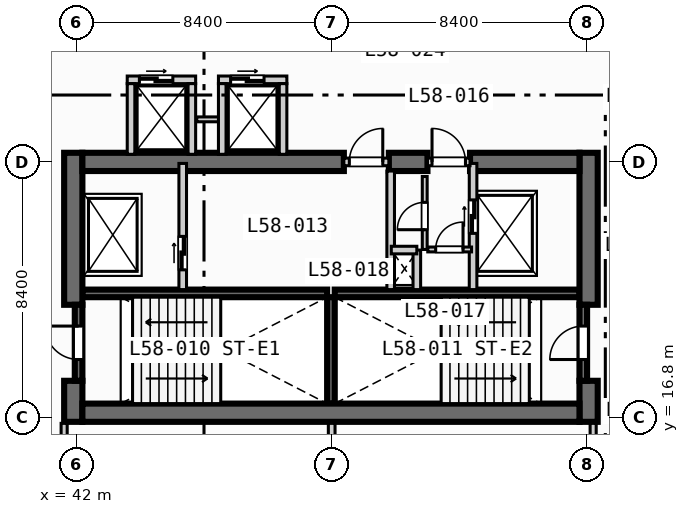
"""IFC4 building model, lengths in metres.
Left out: names, types, materials, properties, quantities, classifications, styles, units other than length and angle.
Written with IfcOpenShell. Run it as: python <this file> out.ifc"""

import sys

from ifc_helpers import new_model, si_unit, direction, frame, frame_2d, origin, place, context, subcontext, project, spatial, rectangle, extrude, element, fill, save


model = new_model("IFC4")
c1 = context("Model", 3, precision=1e-05, world=origin(), true_north=direction((0.0, 1.0)))
c2 = subcontext(c1, "Body", "Model", "MODEL_VIEW")
j1 = project(units=[si_unit("LENGTHUNIT", "METRE"), si_unit("PLANEANGLEUNIT", "RADIAN")], contexts=[c1])
p1 = place(None, origin())
s1 = spatial("IfcSite", under=j1, at=p1, CompositionType="ELEMENT")
p2 = place(p1, origin())
s2 = spatial("IfcBuilding", under=s1, at=p2, CompositionType="ELEMENT")
p3 = place(p2, frame((0.0, 0.0, 237.9)))
s3 = spatial("IfcBuildingStorey", under=s2, at=p3, CompositionType="ELEMENT", Elevation=237.9)
for number, where, z_axis, x_axis in (
    (1, (42.2, 20.875, 0.0), (0.0, 0.0, 1.0), (1.0, 0.0, 0.0)),
    (2, (50.5, 20.875, 0.0), (0.0, 0.0, 1.0), (1.0, 0.0, 0.0)),
):
    element("IfcWall", number, at=place(p3, frame(where, z_axis=z_axis, x_axis=x_axis)), inside=s3, PredefinedType="SOLIDWALL", context=c2, shape_type="SweptSolid", body=[
        extrude(rectangle(XDim=8.05, YDim=0.25, at=frame_2d((4.025, 0.0))), origin(), (0.0, 0.0, 1.0), 3.47),
    ])
p4 = place(p3, frame((50.375, 17.25, 0.0), z_axis=(0.0, 0.0, 1.0), x_axis=(0.0, 1.0, 0.0)))
e3 = element("IfcWall", 3, at=p4, inside=s3, PredefinedType="SOLIDWALL", context=c2, shape_type="SweptSolid", body=[
    extrude(rectangle(XDim=3.5, YDim=0.25, at=frame_2d((1.75, 0.0))), origin(), (0.0, 0.0, 1.0), 3.47),
])
p5 = place(p3, frame((41.9, 16.65, 0.0), z_axis=(0.0, 0.0, 1.0), x_axis=(0.0, 1.0, 0.0)))
e4 = element("IfcWall", 4, at=p5, inside=s3, PredefinedType="SHEAR", context=c2, shape_type="SweptSolid", body=[
    extrude(rectangle(XDim=1.35, YDim=0.6, at=frame_2d((0.675, 0.0))), origin(), (0.0, 0.0, 1.0), 3.47),
])
p6 = place(p3, frame((41.9, 20.5, 0.0), z_axis=(0.0, 0.0, 1.0), x_axis=(0.0, 1.0, 0.0)))
e5 = element("IfcWall", 5, at=p6, inside=s3, PredefinedType="SHEAR", context=c2, shape_type="SweptSolid", body=[
    extrude(rectangle(XDim=5.0, YDim=0.6, at=frame_2d((2.5, 0.0))), origin(), (0.0, 0.0, 1.0), 3.47),
])
p7 = place(p3, frame((58.85, 16.65, 0.0), z_axis=(0.0, 0.0, 1.0), x_axis=(0.0, 1.0, 0.0)))
e6 = element("IfcWall", 6, at=p7, inside=s3, PredefinedType="SHEAR", context=c2, shape_type="SweptSolid", body=[
    extrude(rectangle(XDim=1.35, YDim=0.6, at=frame_2d((0.675, 0.0))), origin(), (0.0, 0.0, 1.0), 3.47),
])
p8 = place(p3, frame((58.85, 20.5, 0.0), z_axis=(0.0, 0.0, 1.0), x_axis=(0.0, 1.0, 0.0)))
e7 = element("IfcWall", 7, at=p8, inside=s3, PredefinedType="SHEAR", context=c2, shape_type="SweptSolid", body=[
    extrude(rectangle(XDim=5.0, YDim=0.6, at=frame_2d((2.5, 0.0))), origin(), (0.0, 0.0, 1.0), 3.47),
])
p9 = place(p3, frame((42.2, 16.95, 0.0), z_axis=(0.0, 0.0, 1.0), x_axis=(1.0, 0.0, 0.0)))
e8 = element("IfcWall", 8, at=p9, inside=s3, PredefinedType="SHEAR", context=c2, shape_type="SweptSolid", body=[
    extrude(rectangle(XDim=16.35, YDim=0.6, at=frame_2d((8.175, 0.0))), origin(), (0.0, 0.0, 1.0), 3.47),
])
p10 = place(p3, frame((42.2, 25.2, 0.0), z_axis=(0.0, 0.0, 1.0), x_axis=(1.0, 0.0, 0.0)))
e9 = element("IfcWall", 9, at=p10, inside=s3, PredefinedType="SHEAR", context=c2, shape_type="SweptSolid", body=[
    extrude(rectangle(XDim=8.6, YDim=0.6, at=frame_2d((4.3, 0.0))), origin(), (0.0, 0.0, 1.0), 3.47),
])
p11 = place(p3, frame((52.28, 25.2, 0.0), z_axis=(0.0, 0.0, 1.0), x_axis=(1.0, 0.0, 0.0)))
e10 = element("IfcWall", 10, at=p11, inside=s3, PredefinedType="SHEAR", context=c2, shape_type="SweptSolid", body=[
    extrude(rectangle(XDim=1.27, YDim=0.6, at=frame_2d((0.635, 0.0))), origin(), (0.0, 0.0, 1.0), 3.47),
])
p12 = place(p3, frame((54.95, 25.2, 0.0), z_axis=(0.0, 0.0, 1.0), x_axis=(1.0, 0.0, 0.0)))
e11 = element("IfcWall", 11, at=p12, inside=s3, PredefinedType="SHEAR", context=c2, shape_type="SweptSolid", body=[
    extrude(rectangle(XDim=3.6, YDim=0.6, at=frame_2d((1.8, 0.0))), origin(), (0.0, 0.0, 1.0), 3.47),
])
p13 = place(p3, frame((42.075, 18.0, 0.0), z_axis=(0.0, 0.0, 1.0), x_axis=(0.0, 1.0, 0.0)))
e12 = element("IfcWall", 12, at=p13, inside=s3, PredefinedType="SOLIDWALL", context=c2, shape_type="SweptSolid", body=[
    extrude(rectangle(XDim=2.5, YDim=0.25, at=frame_2d((1.25, 0.0))), origin(), (0.0, 0.0, 1.0), 3.47),
])
p14 = place(p13, frame((0.7, 0.0, 0.0)))
e13 = element("IfcOpeningElement", 13, at=p14, cuts=e12, PredefinedType="OPENING", context=c2, shape_type="SweptSolid", body=[
    extrude(rectangle(XDim=1.1, YDim=2.15, at=frame_2d((0.55, 1.075))), frame((0.0, 0.135, 0.0), z_axis=(0.0, -1.0, 0.0), x_axis=(1.0, 0.0, 0.0)), (0.0, 0.0, 1.0), 0.27),
])
p15 = place(p3, frame((58.675, 18.0, 0.0), z_axis=(0.0, 0.0, 1.0), x_axis=(0.0, 1.0, 0.0)))
e14 = element("IfcWall", 14, at=p15, inside=s3, PredefinedType="SOLIDWALL", context=c2, shape_type="SweptSolid", body=[
    extrude(rectangle(XDim=2.5, YDim=0.25, at=frame_2d((1.25, 0.0))), origin(), (0.0, 0.0, 1.0), 3.47),
])
p16 = place(p15, frame((0.7, 0.0, 0.0)))
e15 = element("IfcOpeningElement", 15, at=p16, cuts=e14, PredefinedType="OPENING", context=c2, shape_type="SweptSolid", body=[
    extrude(rectangle(XDim=1.1, YDim=2.15, at=frame_2d((0.55, 1.075))), frame((0.0, 0.135, 0.0), z_axis=(0.0, -1.0, 0.0), x_axis=(1.0, 0.0, 0.0)), (0.0, 0.0, 1.0), 0.27),
])
p17 = place(p3, frame((45.5, 21.0, 0.0), z_axis=(0.0, 0.0, 1.0), x_axis=(0.0, 1.0, 0.0)))
e16 = element("IfcWall", 16, at=p17, inside=s3, PredefinedType="SOLIDWALL", context=c2, shape_type="SweptSolid", body=[
    extrude(rectangle(XDim=4.15, YDim=0.25, at=frame_2d((2.075, 0.0))), origin(), (0.0, 0.0, 1.0), 3.47),
])
p18 = place(p17, frame((0.65, 0.0, 0.0)))
e17 = element("IfcOpeningElement", 17, at=p18, cuts=e16, PredefinedType="OPENING", context=c2, shape_type="SweptSolid", body=[
    extrude(rectangle(XDim=1.1, YDim=2.15, at=frame_2d((0.55, 1.075))), frame((0.0, 0.135, 0.0), z_axis=(0.0, -1.0, 0.0), x_axis=(1.0, 0.0, 0.0)), (0.0, 0.0, 1.0), 0.27),
])
p19 = place(p3, frame((50.8, 25.2, 0.0), z_axis=(0.0, 0.0, 1.0), x_axis=(1.0, 0.0, 0.0)))
e18 = element("IfcWall", 18, at=p19, inside=s3, PredefinedType="SOLIDWALL", context=c2, shape_type="SweptSolid", body=[
    extrude(rectangle(XDim=1.48, YDim=0.25, at=frame_2d((0.74, 0.0))), origin(), (0.0, 0.0, 1.0), 3.47),
])
p20 = place(p19, frame((0.18, 0.0, 0.0)))
e19 = element("IfcOpeningElement", 19, at=p20, cuts=e18, PredefinedType="OPENING", context=c2, shape_type="SweptSolid", body=[
    extrude(rectangle(XDim=1.1, YDim=2.15, at=frame_2d((0.55, 1.075))), frame((0.0, 0.135, 0.0), z_axis=(0.0, -1.0, 0.0), x_axis=(1.0, 0.0, 0.0)), (0.0, 0.0, 1.0), 0.27),
])
p21 = place(p3, frame((52.34, 21.0, 0.0), z_axis=(0.0, 0.0, 1.0), x_axis=(0.0, 1.0, 0.0)))
e20 = element("IfcWall", 20, at=p21, inside=s3, PredefinedType="SOLIDWALL", context=c2, shape_type="SweptSolid", body=[
    extrude(rectangle(XDim=3.9, YDim=0.25, at=frame_2d((1.95, 0.0))), origin(), (0.0, 0.0, 1.0), 3.47),
])
p22 = place(p3, frame((55.05, 21.0, 0.0), z_axis=(0.0, 0.0, 1.0), x_axis=(0.0, 1.0, 0.0)))
e21 = element("IfcWall", 21, at=p22, inside=s3, PredefinedType="SOLIDWALL", context=c2, shape_type="SweptSolid", body=[
    extrude(rectangle(XDim=4.15, YDim=0.25, at=frame_2d((2.075, 0.0))), origin(), (0.0, 0.0, 1.0), 3.47),
])
p23 = place(p22, frame((1.85, 0.0, 0.0)))
e22 = element("IfcOpeningElement", 22, at=p23, cuts=e21, PredefinedType="OPENING", context=c2, shape_type="SweptSolid", body=[
    extrude(rectangle(XDim=1.1, YDim=2.15, at=frame_2d((0.55, 1.075))), frame((0.0, 0.135, 0.0), z_axis=(0.0, -1.0, 0.0), x_axis=(1.0, 0.0, 0.0)), (0.0, 0.0, 1.0), 0.27),
])
p24 = place(p3, frame((53.55, 25.2, 0.0), z_axis=(0.0, 0.0, 1.0), x_axis=(1.0, 0.0, 0.0)))
e23 = element("IfcWall", 23, at=p24, inside=s3, PredefinedType="SOLIDWALL", context=c2, shape_type="SweptSolid", body=[
    extrude(rectangle(XDim=1.4, YDim=0.25, at=frame_2d((0.7, 0.0))), origin(), (0.0, 0.0, 1.0), 3.47),
])
p25 = place(p24, frame((0.15, 0.0, 0.0)))
e24 = element("IfcOpeningElement", 24, at=p25, cuts=e23, PredefinedType="OPENING", context=c2, shape_type="SweptSolid", body=[
    extrude(rectangle(XDim=1.1, YDim=2.15, at=frame_2d((0.55, 1.075))), frame((0.0, 0.135, 0.0), z_axis=(0.0, -1.0, 0.0), x_axis=(1.0, 0.0, 0.0)), (0.0, 0.0, 1.0), 0.27),
])
p26 = place(p3, frame((53.2, 21.0, 0.0), z_axis=(0.0, 0.0, 1.0), x_axis=(0.0, 1.0, 0.0)))
e25 = element("IfcWall", 25, at=p26, inside=s3, PredefinedType="SOLIDWALL", context=c2, shape_type="SweptSolid", body=[
    extrude(rectangle(XDim=1.3, YDim=0.25, at=frame_2d((0.65, 0.0))), origin(), (0.0, 0.0, 1.0), 3.47),
])
p27 = place(p3, frame((52.36, 22.3, 0.0), z_axis=(0.0, 0.0, 1.0), x_axis=(1.0, 0.0, 0.0)))
e26 = element("IfcWall", 26, at=p27, inside=s3, PredefinedType="SOLIDWALL", context=c2, shape_type="SweptSolid", body=[
    extrude(rectangle(XDim=0.84, YDim=0.25, at=frame_2d((0.42, 0.0))), origin(), (0.0, 0.0, 1.0), 3.47),
])
p28 = place(p3, frame((53.56, 22.32, 0.0), z_axis=(0.0, 0.0, 1.0), x_axis=(1.0, 0.0, 0.0)))
e27 = element("IfcWall", 27, at=p28, inside=s3, PredefinedType="PARTITIONING", context=c2, shape_type="SweptSolid", body=[
    extrude(rectangle(XDim=1.44, YDim=0.16, at=frame_2d((0.72, 0.0))), origin(), (0.0, 0.0, 1.0), 3.47),
])
p29 = place(p28, frame((0.26, 0.0, 0.0)))
e28 = element("IfcOpeningElement", 28, at=p29, cuts=e27, PredefinedType="OPENING", context=c2, shape_type="SweptSolid", body=[
    extrude(rectangle(XDim=0.9, YDim=2.1, at=frame_2d((0.45, 1.05))), frame((0.0, 0.09, 0.0), z_axis=(0.0, -1.0, 0.0), x_axis=(1.0, 0.0, 0.0)), (0.0, 0.0, 1.0), 0.18),
])
p30 = place(p3, frame((53.46, 22.32, 0.0), z_axis=(0.0, 0.0, 1.0), x_axis=(0.0, 1.0, 0.0)))
e29 = element("IfcWall", 29, at=p30, inside=s3, PredefinedType="PARTITIONING", context=c2, shape_type="SweptSolid", body=[
    extrude(rectangle(XDim=2.4, YDim=0.16, at=frame_2d((1.2, 0.0))), origin(), (0.0, 0.0, 1.0), 3.47),
])
p31 = place(p30, frame((0.65, 0.0, 0.0)))
e30 = element("IfcOpeningElement", 30, at=p31, cuts=e29, PredefinedType="OPENING", context=c2, shape_type="SweptSolid", body=[
    extrude(rectangle(XDim=0.9, YDim=2.1, at=frame_2d((0.45, 1.05))), frame((0.0, 0.09, 0.0), z_axis=(0.0, -1.0, 0.0), x_axis=(1.0, 0.0, 0.0)), (0.0, 0.0, 1.0), 0.18),
])
p32 = place(p3, frame((43.675, 27.9, 0.0), z_axis=(0.0, 0.0, 1.0), x_axis=(1.0, 0.0, 0.0)))
e31 = element("IfcWall", 31, at=p32, inside=s3, PredefinedType="SOLIDWALL", context=c2, shape_type="SweptSolid", body=[
    extrude(rectangle(XDim=2.25, YDim=0.25, at=frame_2d((1.125, 0.0))), origin(), (0.0, 0.0, 1.0), 3.47),
])
p33 = place(p32, frame((0.4, 0.0, 0.0)))
e32 = element("IfcOpeningElement", 32, at=p33, cuts=e31, PredefinedType="OPENING", context=c2, shape_type="SweptSolid", body=[
    extrude(rectangle(XDim=1.1, YDim=2.15, at=frame_2d((0.55, 1.075))), frame((0.0, 0.135, 0.0), z_axis=(0.0, -1.0, 0.0), x_axis=(1.0, 0.0, 0.0)), (0.0, 0.0, 1.0), 0.27),
])
for number, where, z_axis, x_axis in (
    (33, (43.8, 25.45, 0.0), (0.0, 0.0, 1.0), (0.0, 1.0, 0.0)),
    (34, (45.8, 25.45, 0.0), (0.0, 0.0, 1.0), (0.0, 1.0, 0.0)),
):
    element("IfcWall", number, at=place(p3, frame(where, z_axis=z_axis, x_axis=x_axis)), inside=s3, PredefinedType="SOLIDWALL", context=c2, shape_type="SweptSolid", body=[
        extrude(rectangle(XDim=2.325, YDim=0.25, at=frame_2d((1.163, 0.0))), origin(), (0.0, 0.0, 1.0), 3.47),
    ])
p34 = place(p3, frame((45.96, 26.6, 0.0), z_axis=(0.0, 0.0, 1.0), x_axis=(1.0, 0.0, 0.0)))
e35 = element("IfcWall", 35, at=p34, inside=s3, PredefinedType="PARTITIONING", context=c2, shape_type="SweptSolid", body=[
    extrude(rectangle(XDim=0.88, YDim=0.16, at=frame_2d((0.44, 0.0))), origin(), (0.0, 0.0, 1.0), 3.47),
])
p35 = place(p3, frame((46.675, 27.9, 0.0), z_axis=(0.0, 0.0, 1.0), x_axis=(1.0, 0.0, 0.0)))
e36 = element("IfcWall", 36, at=p35, inside=s3, PredefinedType="SOLIDWALL", context=c2, shape_type="SweptSolid", body=[
    extrude(rectangle(XDim=2.25, YDim=0.25, at=frame_2d((1.125, 0.0))), origin(), (0.0, 0.0, 1.0), 3.47),
])
p36 = place(p35, frame((0.4, 0.0, 0.0)))
e37 = element("IfcOpeningElement", 37, at=p36, cuts=e36, PredefinedType="OPENING", context=c2, shape_type="SweptSolid", body=[
    extrude(rectangle(XDim=1.1, YDim=2.15, at=frame_2d((0.55, 1.075))), frame((0.0, 0.135, 0.0), z_axis=(0.0, -1.0, 0.0), x_axis=(1.0, 0.0, 0.0)), (0.0, 0.0, 1.0), 0.27),
])
for number, where, z_axis, x_axis in (
    (38, (46.8, 25.45, 0.0), (0.0, 0.0, 1.0), (0.0, 1.0, 0.0)),
    (39, (48.8, 25.45, 0.0), (0.0, 0.0, 1.0), (0.0, 1.0, 0.0)),
):
    element("IfcWall", number, at=place(p3, frame(where, z_axis=z_axis, x_axis=x_axis)), inside=s3, PredefinedType="SOLIDWALL", context=c2, shape_type="SweptSolid", body=[
        extrude(rectangle(XDim=2.325, YDim=0.25, at=frame_2d((1.163, 0.0))), origin(), (0.0, 0.0, 1.0), 3.47),
    ])
p37 = place(p3, frame((41.6, 8.65, 0.0), z_axis=(0.0, 0.0, 1.0), x_axis=(0.0, 1.0, 0.0)))
e40 = element("IfcWall", 40, at=p37, inside=s3, PredefinedType="PARTITIONING", context=c2, shape_type="SweptSolid", body=[
    extrude(rectangle(XDim=7.95, YDim=0.2, at=frame_2d((3.975, 0.0))), origin(), (0.0, 0.0, 1.0), 3.47),
])
p38 = place(p37, frame((2.2, 0.0, 0.0)))
e41 = element("IfcOpeningElement", 41, at=p38, cuts=e40, PredefinedType="OPENING", context=c2, shape_type="SweptSolid", body=[
    extrude(rectangle(XDim=0.92, YDim=2.1, at=frame_2d((0.46, 1.05))), frame((0.0, 0.11, 0.0), z_axis=(0.0, -1.0, 0.0), x_axis=(1.0, 0.0, 0.0)), (0.0, 0.0, 1.0), 0.22),
])
p39 = place(p3, frame((59.0, 8.65, 0.0), z_axis=(0.0, 0.0, 1.0), x_axis=(0.0, 1.0, 0.0)))
e42 = element("IfcWall", 42, at=p39, inside=s3, PredefinedType="PARTITIONING", context=c2, shape_type="SweptSolid", body=[
    extrude(rectangle(XDim=7.95, YDim=0.2, at=frame_2d((3.975, 0.0))), origin(), (0.0, 0.0, 1.0), 3.16),
])
p40 = place(p39, frame((2.2, 0.0, 0.0)))
e43 = element("IfcOpeningElement", 43, at=p40, cuts=e42, PredefinedType="OPENING", context=c2, shape_type="SweptSolid", body=[
    extrude(rectangle(XDim=0.92, YDim=2.1, at=frame_2d((0.46, 1.05))), frame((0.0, 0.11, 0.0), z_axis=(0.0, -1.0, 0.0), x_axis=(1.0, 0.0, 0.0)), (0.0, 0.0, 1.0), 0.22),
])
p41 = place(p3, frame((50.4, 8.65, 0.0), z_axis=(0.0, 0.0, 1.0), x_axis=(0.0, 1.0, 0.0)))
e44 = element("IfcWall", 44, at=p41, inside=s3, PredefinedType="PARTITIONING", context=c2, shape_type="SweptSolid", body=[
    extrude(rectangle(XDim=7.95, YDim=0.22, at=frame_2d((3.975, 0.0))), origin(), (0.0, 0.0, 1.0), 2.82),
])
p42 = place(p14, origin())
e45 = element("IfcDoor", 45, at=p42, inside=s3, OperationType="SINGLE_SWING_RIGHT", PredefinedType="DOOR", context=c2, shape_type="SweptSolid", body=[
    extrude(rectangle(XDim=1.1, YDim=2.15, at=frame_2d((0.55, 1.075))), frame((0.0, 0.025, 0.0), z_axis=(0.0, -1.0, 0.0), x_axis=(1.0, 0.0, 0.0)), (0.0, 0.0, 1.0), 0.05),
])
fill(e13, e45)
p43 = place(p16, origin())
e46 = element("IfcDoor", 46, at=p43, inside=s3, OperationType="SINGLE_SWING_LEFT", PredefinedType="DOOR", context=c2, shape_type="SweptSolid", body=[
    extrude(rectangle(XDim=1.1, YDim=2.15, at=frame_2d((0.55, 1.075))), frame((0.0, 0.025, 0.0), z_axis=(0.0, -1.0, 0.0), x_axis=(1.0, 0.0, 0.0)), (0.0, 0.0, 1.0), 0.05),
])
fill(e15, e46)
p44 = place(p18, origin())
e47 = element("IfcDoor", 47, at=p44, inside=s3, OperationType="SLIDING_TO_LEFT", PredefinedType="DOOR", context=c2, shape_type="SweptSolid", body=[
    extrude(rectangle(XDim=1.1, YDim=2.15, at=frame_2d((0.55, 1.075))), frame((0.0, 0.025, 0.0), z_axis=(0.0, -1.0, 0.0), x_axis=(1.0, 0.0, 0.0)), (0.0, 0.0, 1.0), 0.05),
])
fill(e17, e47)
p45 = place(p20, origin())
e48 = element("IfcDoor", 48, at=p45, inside=s3, OperationType="SINGLE_SWING_RIGHT", PredefinedType="DOOR", context=c2, shape_type="SweptSolid", body=[
    extrude(rectangle(XDim=1.1, YDim=2.15, at=frame_2d((0.55, 1.075))), frame((0.0, 0.025, 0.0), z_axis=(0.0, -1.0, 0.0), x_axis=(1.0, 0.0, 0.0)), (0.0, 0.0, 1.0), 0.05),
])
fill(e19, e48)
p46 = place(p23, origin())
e49 = element("IfcDoor", 49, at=p46, inside=s3, OperationType="SLIDING_TO_LEFT", PredefinedType="DOOR", context=c2, shape_type="SweptSolid", body=[
    extrude(rectangle(XDim=1.1, YDim=2.15, at=frame_2d((0.55, 1.075))), frame((0.0, 0.025, 0.0), z_axis=(0.0, -1.0, 0.0), x_axis=(1.0, 0.0, 0.0)), (0.0, 0.0, 1.0), 0.05),
])
fill(e22, e49)
p47 = place(p25, origin())
e50 = element("IfcDoor", 50, at=p47, inside=s3, OperationType="SINGLE_SWING_LEFT", PredefinedType="DOOR", context=c2, shape_type="SweptSolid", body=[
    extrude(rectangle(XDim=1.1, YDim=2.15, at=frame_2d((0.55, 1.075))), frame((0.0, 0.025, 0.0), z_axis=(0.0, -1.0, 0.0), x_axis=(1.0, 0.0, 0.0)), (0.0, 0.0, 1.0), 0.05),
])
fill(e24, e50)
p48 = place(p29, origin())
e51 = element("IfcDoor", 51, at=p48, inside=s3, OperationType="SINGLE_SWING_RIGHT", PredefinedType="DOOR", context=c2, shape_type="SweptSolid", body=[
    extrude(rectangle(XDim=0.9, YDim=2.1, at=frame_2d((0.45, 1.05))), frame((0.0, 0.025, 0.0), z_axis=(0.0, -1.0, 0.0), x_axis=(1.0, 0.0, 0.0)), (0.0, 0.0, 1.0), 0.05),
])
fill(e28, e51)
p49 = place(p31, origin())
e52 = element("IfcDoor", 52, at=p49, inside=s3, OperationType="SINGLE_SWING_LEFT", PredefinedType="DOOR", context=c2, shape_type="SweptSolid", body=[
    extrude(rectangle(XDim=0.9, YDim=2.1, at=frame_2d((0.45, 1.05))), frame((0.0, 0.025, 0.0), z_axis=(0.0, -1.0, 0.0), x_axis=(1.0, 0.0, 0.0)), (0.0, 0.0, 1.0), 0.05),
])
fill(e30, e52)
p50 = place(p33, origin())
e53 = element("IfcDoor", 53, at=p50, inside=s3, OperationType="SLIDING_TO_LEFT", PredefinedType="DOOR", context=c2, shape_type="SweptSolid", body=[
    extrude(rectangle(XDim=1.1, YDim=2.15, at=frame_2d((0.55, 1.075))), frame((0.0, 0.025, 0.0), z_axis=(0.0, -1.0, 0.0), x_axis=(1.0, 0.0, 0.0)), (0.0, 0.0, 1.0), 0.05),
])
fill(e32, e53)
p51 = place(p36, origin())
e54 = element("IfcDoor", 54, at=p51, inside=s3, OperationType="SLIDING_TO_LEFT", PredefinedType="DOOR", context=c2, shape_type="SweptSolid", body=[
    extrude(rectangle(XDim=1.1, YDim=2.15, at=frame_2d((0.55, 1.075))), frame((0.0, 0.025, 0.0), z_axis=(0.0, -1.0, 0.0), x_axis=(1.0, 0.0, 0.0)), (0.0, 0.0, 1.0), 0.05),
])
fill(e37, e54)
save(model, sys.argv[1])
